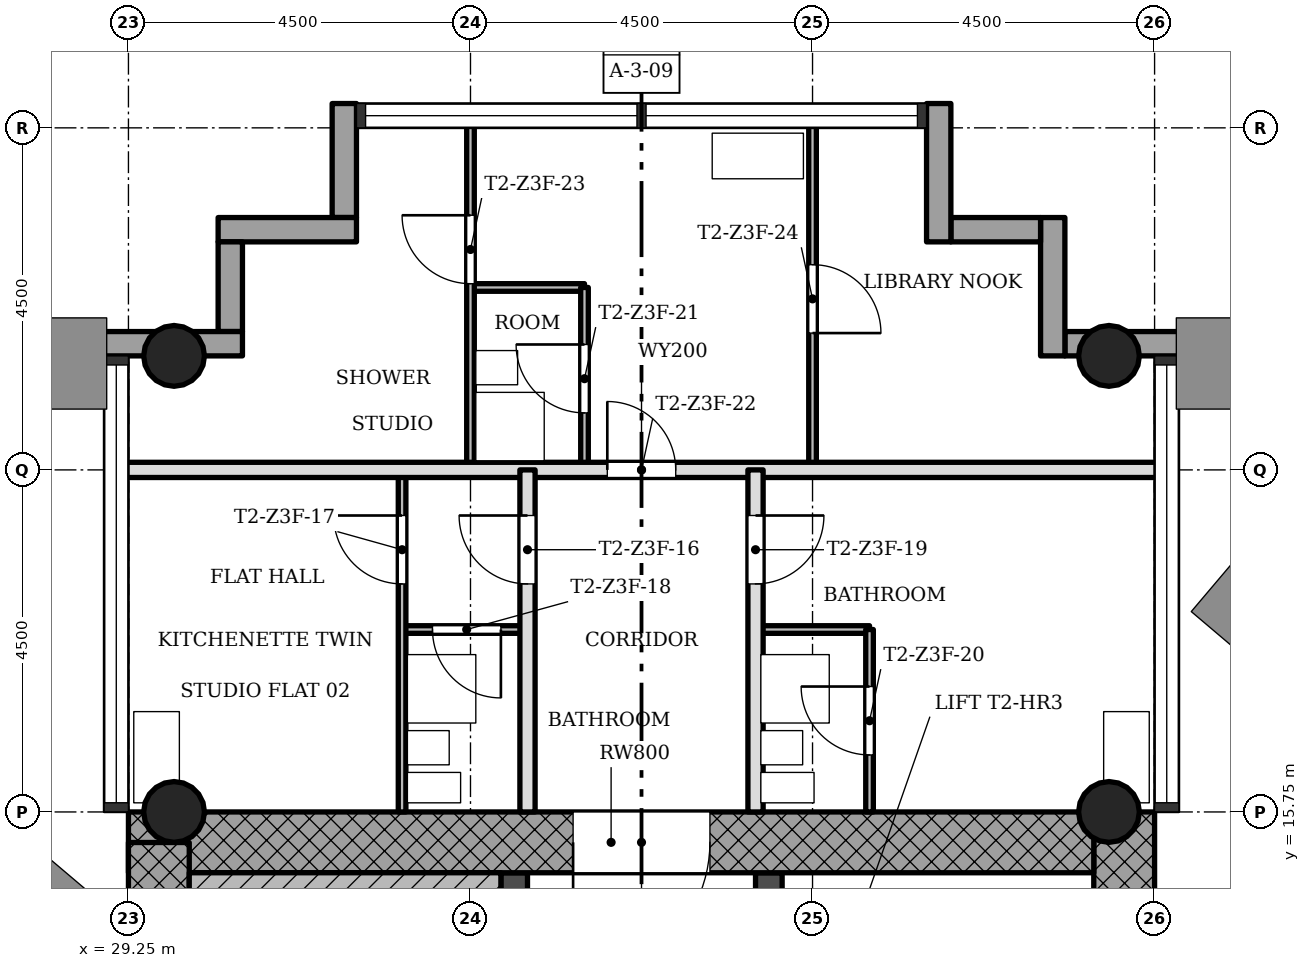
"""IFC4 building model, lengths in metres.
Left out: names, types, materials, properties, quantities, classifications, styles, units other than length and angle.
Written with IfcOpenShell. Run it as: python <this file> out.ifc"""

import sys

from ifc_helpers import new_model, si_unit, direction, frame, frame_2d, origin, origin_2d, place, context, subcontext, project, spatial, rectangle, hollow_circle, extrude, element, fill, save


model = new_model("IFC4")
c1 = context("Model", 3, precision=1e-05, world=origin(), true_north=direction((0.0, 1.0)))
c2 = subcontext(c1, "Body", "Model", "MODEL_VIEW")
j1 = project(units=[si_unit("LENGTHUNIT", "METRE"), si_unit("PLANEANGLEUNIT", "RADIAN")], contexts=[c1])
p1 = place(None, origin())
s1 = spatial("IfcSite", under=j1, at=p1, CompositionType="ELEMENT")
p2 = place(p1, origin())
s2 = spatial("IfcBuilding", under=s1, at=p2, CompositionType="ELEMENT")
p3 = place(p2, frame((0.0, 0.0, 171.1)))
s3 = spatial("IfcBuildingStorey", under=s2, at=p3, CompositionType="ELEMENT", Elevation=171.1)
p4 = place(p3, frame((42.35, 7.55, 0.0), z_axis=(0.0, 0.0, 1.0), x_axis=(0.0, 1.0, 0.0)))
e1 = element("IfcWall", 1, at=p4, inside=s3, PredefinedType="SHEAR", context=c2, shape_type="SweptSolid", body=[
    extrude(rectangle(XDim=8.2, YDim=0.8, at=frame_2d((4.1, 0.0))), origin(), (0.0, 0.0, 1.0), 3.4),
])
p5 = place(p3, frame((41.95, 15.35, 0.0), z_axis=(0.0, 0.0, 1.0), x_axis=(-1.0, 0.0, 0.0)))
e2 = element("IfcWall", 2, at=p5, inside=s3, PredefinedType="SHEAR", context=c2, shape_type="SweptSolid", body=[
    extrude(rectangle(XDim=12.7, YDim=0.8, at=frame_2d((6.35, 0.0))), origin(), (0.0, 0.0, 1.0), 3.4),
])
p6 = place(p5, frame((5.05, 0.0, 0.0)))
e3 = element("IfcOpeningElement", 3, at=p6, cuts=e2, PredefinedType="OPENING", context=c2, shape_type="SweptSolid", body=[
    extrude(rectangle(XDim=1.8, YDim=2.1, at=frame_2d((0.9, 1.05))), frame((0.0, 0.41, 0.0), z_axis=(0.0, -1.0, 0.0), x_axis=(1.0, 0.0, 0.0)), (0.0, 0.0, 1.0), 0.82),
])
p7 = place(p3, frame((29.65, 15.348, 0.0), z_axis=(0.0, 0.0, 1.0), x_axis=(0.0, -1.0, 0.0)))
e4 = element("IfcWall", 4, at=p7, inside=s3, PredefinedType="SHEAR", context=c2, shape_type="SweptSolid", body=[
    extrude(rectangle(XDim=8.796, YDim=0.8, at=frame_2d((4.398, 0.0))), origin(), (0.0, 0.0, 1.0), 3.4),
])
p8 = place(p3, frame((34.325, 7.55, 0.0), z_axis=(0.0, 0.0, 1.0), x_axis=(0.0, 1.0, 0.0)))
e5 = element("IfcWall", 5, at=p8, inside=s3, PredefinedType="SHEAR", context=c2, shape_type="SweptSolid", body=[
    extrude(rectangle(XDim=7.4, YDim=0.35, at=frame_2d((3.7, 0.0))), origin(), (0.0, 0.0, 1.0), 3.4),
])
p9 = place(p8, frame((0.85, 0.0, 0.0)))
e6 = element("IfcOpeningElement", 6, at=p9, cuts=e5, PredefinedType="OPENING", context=c2, shape_type="SweptSolid", body=[
    extrude(rectangle(XDim=0.9, YDim=2.1, at=frame_2d((0.45, 1.05))), frame((0.0, 0.185, 0.0), z_axis=(0.0, -1.0, 0.0), x_axis=(1.0, 0.0, 0.0)), (0.0, 0.0, 1.0), 0.37),
])
p10 = place(p3, frame((37.675, 7.55, 0.0), z_axis=(0.0, 0.0, 1.0), x_axis=(0.0, 1.0, 0.0)))
e7 = element("IfcWall", 7, at=p10, inside=s3, PredefinedType="SHEAR", context=c2, shape_type="SweptSolid", body=[
    extrude(rectangle(XDim=7.4, YDim=0.35, at=frame_2d((3.7, 0.0))), origin(), (0.0, 0.0, 1.0), 3.4),
])
p11 = place(p10, frame((0.95, 0.0, 0.0)))
e8 = element("IfcOpeningElement", 8, at=p11, cuts=e7, PredefinedType="OPENING", context=c2, shape_type="SweptSolid", body=[
    extrude(rectangle(XDim=1.1, YDim=2.1, at=frame_2d((0.55, 1.05))), frame((0.0, 0.185, 0.0), z_axis=(0.0, -1.0, 0.0), x_axis=(1.0, 0.0, 0.0)), (0.0, 0.0, 1.0), 0.37),
])
p12 = place(p10, frame((3.15, 0.0, 0.0)))
e9 = element("IfcOpeningElement", 9, at=p12, cuts=e7, PredefinedType="OPENING", context=c2, shape_type="SweptSolid", body=[
    extrude(rectangle(XDim=1.1, YDim=2.1, at=frame_2d((0.55, 1.05))), frame((0.0, 0.185, 0.0), z_axis=(0.0, -1.0, 0.0), x_axis=(1.0, 0.0, 0.0)), (0.0, 0.0, 1.0), 0.37),
])
p13 = place(p10, frame((5.35, 0.0, 0.0)))
e10 = element("IfcOpeningElement", 10, at=p13, cuts=e7, PredefinedType="OPENING", context=c2, shape_type="SweptSolid", body=[
    extrude(rectangle(XDim=1.1, YDim=2.1, at=frame_2d((0.55, 1.05))), frame((0.0, 0.185, 0.0), z_axis=(0.0, -1.0, 0.0), x_axis=(1.0, 0.0, 0.0)), (0.0, 0.0, 1.0), 0.37),
])
for number, where, z_axis, x_axis in (
    (11, (42.15, 15.75, 0.0), (0.0, 0.0, 1.0), (1.0, 0.0, 0.0)),
    (12, (29.85, 15.75, 0.0), (0.0, 0.0, 1.0), (1.0, 0.0, 0.0)),
    (13, (42.15, 21.75, 0.0), (0.0, 0.0, 1.0), (1.0, 0.0, 0.0)),
    (14, (29.85, 21.75, 0.0), (0.0, 0.0, 1.0), (1.0, 0.0, 0.0)),
):
    element("IfcColumn", number, at=place(p3, frame(where, z_axis=z_axis, x_axis=x_axis)), inside=s3, PredefinedType="COLUMN", context=c2, shape_type="SweptSolid", body=[
        extrude(hollow_circle(Radius=0.4, WallThickness=0.028, at=origin_2d()), origin(), (0.0, 0.0, 1.0), 3.4),
    ])
p14 = place(p3, frame((43.07, 21.91, -0.3), z_axis=(0.0, 0.0, 1.0), x_axis=(-1.0, 0.0, 0.0)))
e15 = element("IfcWall", 15, at=p14, inside=s3, PredefinedType="STANDARD", context=c2, shape_type="SweptSolid", body=[
    extrude(rectangle(XDim=1.5, YDim=0.32, at=frame_2d((0.75, 0.0))), origin(), (0.0, 0.0, 1.0), 3.4),
])
p15 = place(p3, frame((41.41, 21.75, -0.3), z_axis=(0.0, 0.0, 1.0), x_axis=(0.0, 1.0, 0.0)))
e16 = element("IfcWall", 16, at=p15, inside=s3, PredefinedType="STANDARD", context=c2, shape_type="SweptSolid", body=[
    extrude(rectangle(XDim=1.82, YDim=0.32, at=frame_2d((0.91, 0.0))), origin(), (0.0, 0.0, 1.0), 3.4),
])
p16 = place(p3, frame((41.25, 23.41, -0.3), z_axis=(0.0, 0.0, 1.0), x_axis=(-1.0, 0.0, 0.0)))
e17 = element("IfcWall", 17, at=p16, inside=s3, PredefinedType="STANDARD", context=c2, shape_type="SweptSolid", body=[
    extrude(rectangle(XDim=1.18, YDim=0.32, at=frame_2d((0.59, 0.0))), origin(), (0.0, 0.0, 1.0), 3.4),
])
p17 = place(p3, frame((39.91, 23.25, -0.3), z_axis=(0.0, 0.0, 1.0), x_axis=(0.0, 1.0, 0.0)))
e18 = element("IfcWall", 18, at=p17, inside=s3, PredefinedType="STANDARD", context=c2, shape_type="SweptSolid", body=[
    extrude(rectangle(XDim=1.82, YDim=0.32, at=frame_2d((0.91, 0.0))), origin(), (0.0, 0.0, 1.0), 3.4),
])
p18 = place(p3, frame((32.09, 25.07, -0.3), z_axis=(0.0, 0.0, 1.0), x_axis=(0.0, -1.0, 0.0)))
e19 = element("IfcWall", 19, at=p18, inside=s3, PredefinedType="STANDARD", context=c2, shape_type="SweptSolid", body=[
    extrude(rectangle(XDim=1.5, YDim=0.32, at=frame_2d((0.75, 0.0))), origin(), (0.0, 0.0, 1.0), 3.4),
])
p19 = place(p3, frame((32.25, 23.41, -0.3), z_axis=(0.0, 0.0, 1.0), x_axis=(-1.0, 0.0, 0.0)))
e20 = element("IfcWall", 20, at=p19, inside=s3, PredefinedType="STANDARD", context=c2, shape_type="SweptSolid", body=[
    extrude(rectangle(XDim=1.82, YDim=0.32, at=frame_2d((0.91, 0.0))), origin(), (0.0, 0.0, 1.0), 3.4),
])
p20 = place(p3, frame((30.59, 23.25, -0.3), z_axis=(0.0, 0.0, 1.0), x_axis=(0.0, -1.0, 0.0)))
e21 = element("IfcWall", 21, at=p20, inside=s3, PredefinedType="STANDARD", context=c2, shape_type="SweptSolid", body=[
    extrude(rectangle(XDim=1.18, YDim=0.32, at=frame_2d((0.59, 0.0))), origin(), (0.0, 0.0, 1.0), 3.4),
])
p21 = place(p3, frame((30.75, 21.91, -0.3), z_axis=(0.0, 0.0, 1.0), x_axis=(-1.0, 0.0, 0.0)))
e22 = element("IfcWall", 22, at=p21, inside=s3, PredefinedType="STANDARD", context=c2, shape_type="SweptSolid", body=[
    extrude(rectangle(XDim=1.82, YDim=0.32, at=frame_2d((0.91, 0.0))), origin(), (0.0, 0.0, 1.0), 3.4),
])
p22 = place(p3, frame((39.0, 18.15, 0.0), z_axis=(0.0, 0.0, 1.0), x_axis=(-1.0, 0.0, 0.0)))
e23 = element("IfcWall", 23, at=p22, inside=s3, PredefinedType="PARTITIONING", context=c2, shape_type="SweptSolid", body=[
    extrude(rectangle(XDim=1.5, YDim=0.1, at=frame_2d((0.75, 0.0))), origin(), (0.0, 0.0, 1.0), 3.0),
])
p23 = place(p3, frame((34.5, 18.15, 0.0), z_axis=(0.0, 0.0, 1.0), x_axis=(-1.0, 0.0, 0.0)))
e24 = element("IfcWall", 24, at=p23, inside=s3, PredefinedType="PARTITIONING", context=c2, shape_type="SweptSolid", body=[
    extrude(rectangle(XDim=1.65, YDim=0.1, at=frame_2d((0.825, 0.0))), origin(), (0.0, 0.0, 1.0), 3.0),
])
p24 = place(p23, frame((0.35, 0.0, 0.0)))
e25 = element("IfcOpeningElement", 25, at=p24, cuts=e24, PredefinedType="OPENING", context=c2, shape_type="SweptSolid", body=[
    extrude(rectangle(XDim=0.9, YDim=2.1, at=frame_2d((0.45, 1.05))), frame((0.0, 0.06, 0.0), z_axis=(0.0, -1.0, 0.0), x_axis=(1.0, 0.0, 0.0)), (0.0, 0.0, 1.0), 0.12),
])
p25 = place(p3, frame((42.85, 20.25, 0.0), z_axis=(0.0, 0.0, 1.0), x_axis=(-1.0, 0.0, 0.0)))
e26 = element("IfcWall", 26, at=p25, inside=s3, PredefinedType="SOLIDWALL", context=c2, shape_type="SweptSolid", body=[
    extrude(rectangle(XDim=13.7, YDim=0.2, at=frame_2d((6.85, 0.0))), origin(), (0.0, 0.0, 1.0), 3.0),
])
p26 = place(p25, frame((6.4, 0.0, 0.0)))
e27 = element("IfcOpeningElement", 27, at=p26, cuts=e26, PredefinedType="OPENING", context=c2, shape_type="SweptSolid", body=[
    extrude(rectangle(XDim=0.9, YDim=2.1, at=frame_2d((0.45, 1.05))), frame((0.0, 0.11, 0.0), z_axis=(0.0, -1.0, 0.0), x_axis=(1.0, 0.0, 0.0)), (0.0, 0.0, 1.0), 0.22),
])
p27 = place(p3, frame((35.25, 22.65, 0.0), z_axis=(0.0, 0.0, 1.0), x_axis=(-1.0, 0.0, 0.0)))
e28 = element("IfcWall", 28, at=p27, inside=s3, PredefinedType="PARTITIONING", context=c2, shape_type="SweptSolid", body=[
    extrude(rectangle(XDim=1.5, YDim=0.1, at=frame_2d((0.75, 0.0))), origin(), (0.0, 0.0, 1.0), 3.0),
])
p28 = place(p3, frame((39.0, 15.75, 0.0), z_axis=(0.0, 0.0, 1.0), x_axis=(0.0, 1.0, 0.0)))
e29 = element("IfcWall", 29, at=p28, inside=s3, PredefinedType="PARTITIONING", context=c2, shape_type="SweptSolid", body=[
    extrude(rectangle(XDim=2.4, YDim=0.1, at=frame_2d((1.2, 0.0))), origin(), (0.0, 0.0, 1.0), 3.0),
])
p29 = place(p28, frame((0.75, 0.0, 0.0)))
e30 = element("IfcOpeningElement", 30, at=p29, cuts=e29, PredefinedType="OPENING", context=c2, shape_type="SweptSolid", body=[
    extrude(rectangle(XDim=0.9, YDim=2.1, at=frame_2d((0.45, 1.05))), frame((0.0, 0.06, 0.0), z_axis=(0.0, -1.0, 0.0), x_axis=(1.0, 0.0, 0.0)), (0.0, 0.0, 1.0), 0.12),
])
p30 = place(p3, frame((38.25, 20.25, 0.0), z_axis=(0.0, 0.0, 1.0), x_axis=(0.0, 1.0, 0.0)))
e31 = element("IfcWall", 31, at=p30, inside=s3, PredefinedType="PARTITIONING", context=c2, shape_type="SweptSolid", body=[
    extrude(rectangle(XDim=4.6, YDim=0.1, at=frame_2d((2.3, 0.0))), origin(), (0.0, 0.0, 1.0), 3.0),
])
p31 = place(p30, frame((1.8, 0.0, 0.0)))
e32 = element("IfcOpeningElement", 32, at=p31, cuts=e31, PredefinedType="OPENING", context=c2, shape_type="SweptSolid", body=[
    extrude(rectangle(XDim=0.9, YDim=2.1, at=frame_2d((0.45, 1.05))), frame((0.0, 0.06, 0.0), z_axis=(0.0, -1.0, 0.0), x_axis=(1.0, 0.0, 0.0)), (0.0, 0.0, 1.0), 0.12),
])
p32 = place(p3, frame((37.5, 15.75, 0.0), z_axis=(0.0, 0.0, 1.0), x_axis=(0.0, 1.0, 0.0)))
e33 = element("IfcWall", 33, at=p32, inside=s3, PredefinedType="SOLIDWALL", context=c2, shape_type="SweptSolid", body=[
    extrude(rectangle(XDim=4.5, YDim=0.2, at=frame_2d((2.25, 0.0))), origin(), (0.0, 0.0, 1.0), 3.0),
])
p33 = place(p32, frame((3.0, 0.0, 0.0)))
e34 = element("IfcOpeningElement", 34, at=p33, cuts=e33, PredefinedType="OPENING", context=c2, shape_type="SweptSolid", body=[
    extrude(rectangle(XDim=0.9, YDim=2.1, at=frame_2d((0.45, 1.05))), frame((0.0, 0.11, 0.0), z_axis=(0.0, -1.0, 0.0), x_axis=(1.0, 0.0, 0.0)), (0.0, 0.0, 1.0), 0.22),
])
p34 = place(p3, frame((35.25, 20.25, 0.0), z_axis=(0.0, 0.0, 1.0), x_axis=(0.0, 1.0, 0.0)))
e35 = element("IfcWall", 35, at=p34, inside=s3, PredefinedType="PARTITIONING", context=c2, shape_type="SweptSolid", body=[
    extrude(rectangle(XDim=2.4, YDim=0.1, at=frame_2d((1.2, 0.0))), origin(), (0.0, 0.0, 1.0), 3.0),
])
p35 = place(p34, frame((0.75, 0.0, 0.0)))
e36 = element("IfcOpeningElement", 36, at=p35, cuts=e35, PredefinedType="OPENING", context=c2, shape_type="SweptSolid", body=[
    extrude(rectangle(XDim=0.9, YDim=2.1, at=frame_2d((0.45, 1.05))), frame((0.0, 0.06, 0.0), z_axis=(0.0, -1.0, 0.0), x_axis=(1.0, 0.0, 0.0)), (0.0, 0.0, 1.0), 0.12),
])
p36 = place(p3, frame((34.5, 15.75, 0.0), z_axis=(0.0, 0.0, 1.0), x_axis=(0.0, 1.0, 0.0)))
e37 = element("IfcWall", 37, at=p36, inside=s3, PredefinedType="SOLIDWALL", context=c2, shape_type="SweptSolid", body=[
    extrude(rectangle(XDim=4.5, YDim=0.2, at=frame_2d((2.25, 0.0))), origin(), (0.0, 0.0, 1.0), 3.0),
])
p37 = place(p36, frame((3.0, 0.0, 0.0)))
e38 = element("IfcOpeningElement", 38, at=p37, cuts=e37, PredefinedType="OPENING", context=c2, shape_type="SweptSolid", body=[
    extrude(rectangle(XDim=0.9, YDim=2.1, at=frame_2d((0.45, 1.05))), frame((0.0, 0.11, 0.0), z_axis=(0.0, -1.0, 0.0), x_axis=(1.0, 0.0, 0.0)), (0.0, 0.0, 1.0), 0.22),
])
p38 = place(p3, frame((33.75, 20.25, 0.0), z_axis=(0.0, 0.0, 1.0), x_axis=(0.0, 1.0, 0.0)))
e39 = element("IfcWall", 39, at=p38, inside=s3, PredefinedType="PARTITIONING", context=c2, shape_type="SweptSolid", body=[
    extrude(rectangle(XDim=4.6, YDim=0.1, at=frame_2d((2.3, 0.0))), origin(), (0.0, 0.0, 1.0), 3.0),
])
p39 = place(p38, frame((2.45, 0.0, 0.0)))
e40 = element("IfcOpeningElement", 40, at=p39, cuts=e39, PredefinedType="OPENING", context=c2, shape_type="SweptSolid", body=[
    extrude(rectangle(XDim=0.9, YDim=2.1, at=frame_2d((0.45, 1.05))), frame((0.0, 0.06, 0.0), z_axis=(0.0, -1.0, 0.0), x_axis=(1.0, 0.0, 0.0)), (0.0, 0.0, 1.0), 0.12),
])
p40 = place(p3, frame((32.85, 15.75, 0.0), z_axis=(0.0, 0.0, 1.0), x_axis=(0.0, 1.0, 0.0)))
e41 = element("IfcWall", 41, at=p40, inside=s3, PredefinedType="PARTITIONING", context=c2, shape_type="SweptSolid", body=[
    extrude(rectangle(XDim=4.5, YDim=0.1, at=frame_2d((2.25, 0.0))), origin(), (0.0, 0.0, 1.0), 3.0),
])
p41 = place(p40, frame((3.0, 0.0, 0.0)))
e42 = element("IfcOpeningElement", 42, at=p41, cuts=e41, PredefinedType="OPENING", context=c2, shape_type="SweptSolid", body=[
    extrude(rectangle(XDim=0.9, YDim=2.1, at=frame_2d((0.45, 1.05))), frame((0.0, 0.06, 0.0), z_axis=(0.0, -1.0, 0.0), x_axis=(1.0, 0.0, 0.0)), (0.0, 0.0, 1.0), 0.12),
])
p42 = place(p3, frame((34.15, 14.75, 0.0), z_axis=(0.0, 0.0, 1.0), x_axis=(-1.0, 0.0, 0.0)))
e43 = element("IfcWall", 43, at=p42, inside=s3, PredefinedType="SHEAR", context=c2, shape_type="SweptSolid", body=[
    extrude(rectangle(XDim=4.1, YDim=0.4, at=frame_2d((2.05, 0.0))), origin(), (0.0, 0.0, 1.0), 3.4),
])
p43 = place(p37, origin())
e44 = element("IfcDoor", 44, at=p43, inside=s3, OperationType="SINGLE_SWING_LEFT", PredefinedType="DOOR", context=c2, shape_type="SweptSolid", body=[
    extrude(rectangle(XDim=0.9, YDim=2.1, at=frame_2d((0.45, 1.05))), frame((0.0, 0.025, 0.0), z_axis=(0.0, -1.0, 0.0), x_axis=(1.0, 0.0, 0.0)), (0.0, 0.0, 1.0), 0.05),
])
fill(e38, e44)
p44 = place(p41, origin())
e45 = element("IfcDoor", 45, at=p44, inside=s3, OperationType="SINGLE_SWING_LEFT", PredefinedType="DOOR", context=c2, shape_type="SweptSolid", body=[
    extrude(rectangle(XDim=0.9, YDim=2.1, at=frame_2d((0.45, 1.05))), frame((0.0, 0.025, 0.0), z_axis=(0.0, -1.0, 0.0), x_axis=(1.0, 0.0, 0.0)), (0.0, 0.0, 1.0), 0.05),
])
fill(e42, e45)
p45 = place(p24, origin())
e46 = element("IfcDoor", 46, at=p45, inside=s3, OperationType="SINGLE_SWING_RIGHT", PredefinedType="DOOR", context=c2, shape_type="SweptSolid", body=[
    extrude(rectangle(XDim=0.9, YDim=2.1, at=frame_2d((0.45, 1.05))), frame((0.0, 0.025, 0.0), z_axis=(0.0, -1.0, 0.0), x_axis=(1.0, 0.0, 0.0)), (0.0, 0.0, 1.0), 0.05),
])
fill(e25, e46)
p46 = place(p33, origin())
e47 = element("IfcDoor", 47, at=p46, inside=s3, OperationType="SINGLE_SWING_RIGHT", PredefinedType="DOOR", context=c2, shape_type="SweptSolid", body=[
    extrude(rectangle(XDim=0.9, YDim=2.1, at=frame_2d((0.45, 1.05))), frame((0.0, 0.025, 0.0), z_axis=(0.0, -1.0, 0.0), x_axis=(1.0, 0.0, 0.0)), (0.0, 0.0, 1.0), 0.05),
])
fill(e34, e47)
p47 = place(p29, origin())
e48 = element("IfcDoor", 48, at=p47, inside=s3, OperationType="SINGLE_SWING_LEFT", PredefinedType="DOOR", context=c2, shape_type="SweptSolid", body=[
    extrude(rectangle(XDim=0.9, YDim=2.1, at=frame_2d((0.45, 1.05))), frame((0.0, 0.025, 0.0), z_axis=(0.0, -1.0, 0.0), x_axis=(1.0, 0.0, 0.0)), (0.0, 0.0, 1.0), 0.05),
])
fill(e30, e48)
p48 = place(p35, origin())
e49 = element("IfcDoor", 49, at=p48, inside=s3, OperationType="SINGLE_SWING_LEFT", PredefinedType="DOOR", context=c2, shape_type="SweptSolid", body=[
    extrude(rectangle(XDim=0.9, YDim=2.1, at=frame_2d((0.45, 1.05))), frame((0.0, 0.025, 0.0), z_axis=(0.0, -1.0, 0.0), x_axis=(1.0, 0.0, 0.0)), (0.0, 0.0, 1.0), 0.05),
])
fill(e36, e49)
p49 = place(p26, origin())
e50 = element("IfcDoor", 50, at=p49, inside=s3, OperationType="SINGLE_SWING_RIGHT", PredefinedType="DOOR", context=c2, shape_type="SweptSolid", body=[
    extrude(rectangle(XDim=0.9, YDim=2.1, at=frame_2d((0.45, 1.05))), frame((0.0, 0.025, 0.0), z_axis=(0.0, -1.0, 0.0), x_axis=(1.0, 0.0, 0.0)), (0.0, 0.0, 1.0), 0.05),
])
fill(e27, e50)
p50 = place(p39, origin())
e51 = element("IfcDoor", 51, at=p50, inside=s3, OperationType="SINGLE_SWING_LEFT", PredefinedType="DOOR", context=c2, shape_type="SweptSolid", body=[
    extrude(rectangle(XDim=0.9, YDim=2.1, at=frame_2d((0.45, 1.05))), frame((0.0, 0.025, 0.0), z_axis=(0.0, -1.0, 0.0), x_axis=(1.0, 0.0, 0.0)), (0.0, 0.0, 1.0), 0.05),
])
fill(e40, e51)
p51 = place(p31, origin())
e52 = element("IfcDoor", 52, at=p51, inside=s3, OperationType="SINGLE_SWING_LEFT", PredefinedType="DOOR", context=c2, shape_type="SweptSolid", body=[
    extrude(rectangle(XDim=0.9, YDim=2.1, at=frame_2d((0.45, 1.05))), frame((0.0, 0.025, 0.0), z_axis=(0.0, -1.0, 0.0), x_axis=(1.0, 0.0, 0.0)), (0.0, 0.0, 1.0), 0.05),
])
fill(e32, e52)
p52 = place(p6, origin())
e53 = element("IfcDoor", 53, at=p52, inside=s3, OperationType="SINGLE_SWING_LEFT", PredefinedType="DOOR", context=c2, shape_type="SweptSolid", body=[
    extrude(rectangle(XDim=1.8, YDim=2.1, at=frame_2d((0.9, 1.05))), frame((0.0, 0.025, 0.0), z_axis=(0.0, -1.0, 0.0), x_axis=(1.0, 0.0, 0.0)), (0.0, 0.0, 1.0), 0.05),
])
fill(e3, e53)
save(model, sys.argv[1])
